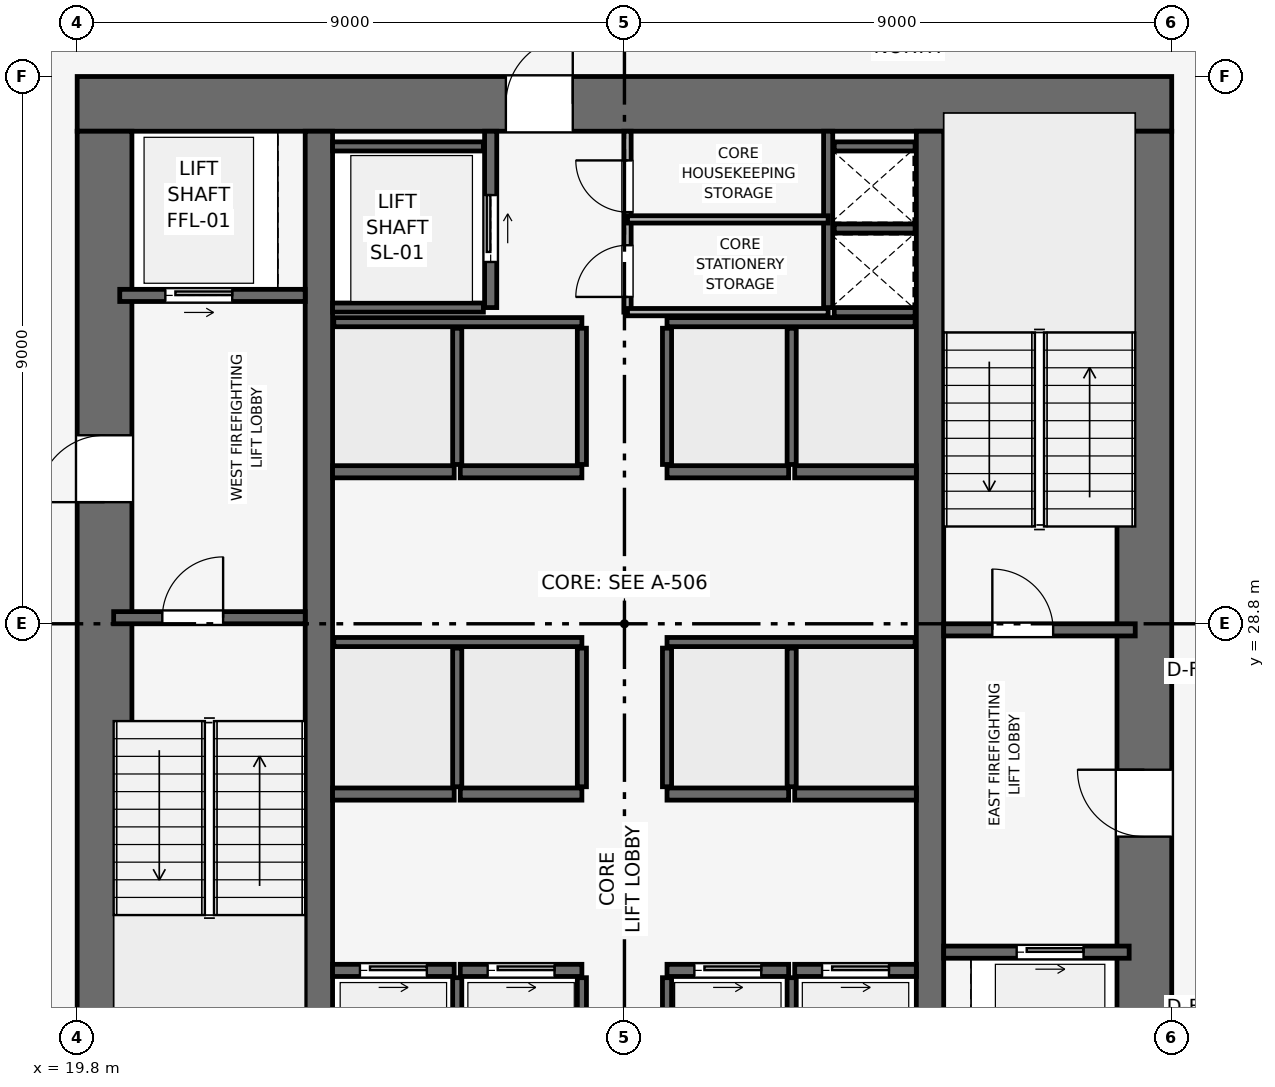
"""IFC4 building model, lengths in metres.
Left out: names, types, materials, properties, quantities, classifications, styles, units other than length and angle.
Written with IfcOpenShell. Run it as: python <this file> out.ifc"""

import sys

from ifc_helpers import new_model, si_unit, direction, frame, frame_2d, origin, place, context, subcontext, project, spatial, rectangle, extrude, element, fill, save


model = new_model("IFC4")
c1 = context("Model", 3, precision=1e-05, world=origin(), true_north=direction((0.0, 1.0)))
c2 = subcontext(c1, "Body", "Model", "MODEL_VIEW")
j1 = project(units=[si_unit("LENGTHUNIT", "METRE"), si_unit("PLANEANGLEUNIT", "RADIAN")], contexts=[c1])
p1 = place(None, origin())
s1 = spatial("IfcSite", under=j1, at=p1, CompositionType="ELEMENT")
p2 = place(p1, origin())
s2 = spatial("IfcBuilding", under=s1, at=p2, CompositionType="ELEMENT")
p3 = place(p2, frame((0.0, 0.0, 117.3)))
s3 = spatial("IfcBuildingStorey", under=s2, at=p3, CompositionType="ELEMENT", Elevation=117.3)
p4 = place(p3, frame((19.8, 37.35, 0.0), z_axis=(0.0, 0.0, 1.0), x_axis=(1.0, 0.0, 0.0)))
e1 = element("IfcWall", 1, at=p4, inside=s3, PredefinedType="SHEAR", context=c2, shape_type="SweptSolid", body=[
    extrude(rectangle(XDim=18.0, YDim=0.9, at=frame_2d((9.0, 0.0))), origin(), (0.0, 0.0, 1.0), 3.9),
])
p5 = place(p4, frame((7.05, 0.0, 0.0)))
e2 = element("IfcOpeningElement", 2, at=p5, cuts=e1, PredefinedType="OPENING", context=c2, shape_type="SweptSolid", body=[
    extrude(rectangle(XDim=1.1, YDim=2.15, at=frame_2d((0.55, 1.075))), frame((0.0, 0.46, 0.0), z_axis=(0.0, -1.0, 0.0), x_axis=(1.0, 0.0, 0.0)), (0.0, 0.0, 1.0), 0.92),
])
p6 = place(p3, frame((20.25, 20.7, 0.0), z_axis=(0.0, 0.0, 1.0), x_axis=(0.0, 1.0, 0.0)))
e3 = element("IfcWall", 3, at=p6, inside=s3, PredefinedType="SHEAR", context=c2, shape_type="SweptSolid", body=[
    extrude(rectangle(XDim=16.2, YDim=0.9, at=frame_2d((8.1, 0.0))), origin(), (0.0, 0.0, 1.0), 3.9),
])
p7 = place(p6, frame((10.1, 0.0, 0.0)))
e4 = element("IfcOpeningElement", 4, at=p7, cuts=e3, PredefinedType="OPENING", context=c2, shape_type="SweptSolid", body=[
    extrude(rectangle(XDim=1.1, YDim=2.15, at=frame_2d((0.55, 1.075))), frame((0.0, 0.46, 0.0), z_axis=(0.0, -1.0, 0.0), x_axis=(1.0, 0.0, 0.0)), (0.0, 0.0, 1.0), 0.92),
])
p8 = place(p3, frame((37.35, 20.7, 0.0), z_axis=(0.0, 0.0, 1.0), x_axis=(0.0, 1.0, 0.0)))
e5 = element("IfcWall", 5, at=p8, inside=s3, PredefinedType="SHEAR", context=c2, shape_type="SweptSolid", body=[
    extrude(rectangle(XDim=16.2, YDim=0.9, at=frame_2d((8.1, 0.0))), origin(), (0.0, 0.0, 1.0), 3.9),
])
p9 = place(p8, frame((4.6, 0.0, 0.0)))
e6 = element("IfcOpeningElement", 6, at=p9, cuts=e5, PredefinedType="OPENING", context=c2, shape_type="SweptSolid", body=[
    extrude(rectangle(XDim=1.1, YDim=2.15, at=frame_2d((0.55, 1.075))), frame((0.0, 0.46, 0.0), z_axis=(0.0, -1.0, 0.0), x_axis=(1.0, 0.0, 0.0)), (0.0, 0.0, 1.0), 0.92),
])
for number, where, z_axis, x_axis in (
    (7, (23.775, 20.7, 0.0), (0.0, 0.0, 1.0), (0.0, 1.0, 0.0)),
    (8, (33.825, 20.7, 0.0), (0.0, 0.0, 1.0), (0.0, 1.0, 0.0)),
):
    element("IfcWall", number, at=place(p3, frame(where, z_axis=z_axis, x_axis=x_axis)), inside=s3, PredefinedType="SHEAR", context=c2, shape_type="SweptSolid", body=[
        extrude(rectangle(XDim=16.2, YDim=0.45, at=frame_2d((8.1, 0.0))), origin(), (0.0, 0.0, 1.0), 3.9),
    ])
p10 = place(p3, frame((20.4, 28.9, 0.0), z_axis=(0.0, 0.0, 1.0), x_axis=(1.0, 0.0, 0.0)))
e9 = element("IfcWall", 9, at=p10, inside=s3, PredefinedType="SHEAR", context=c2, shape_type="SweptSolid", body=[
    extrude(rectangle(XDim=3.15, YDim=0.2, at=frame_2d((1.575, 0.0))), origin(), (0.0, 0.0, 1.0), 3.65),
])
p11 = place(p10, frame((0.8, 0.0, 0.0)))
e10 = element("IfcOpeningElement", 10, at=p11, cuts=e9, PredefinedType="OPENING", context=c2, shape_type="SweptSolid", body=[
    extrude(rectangle(XDim=1.0, YDim=2.1, at=frame_2d((0.5, 1.05))), frame((0.0, 0.11, 0.0), z_axis=(0.0, -1.0, 0.0), x_axis=(1.0, 0.0, 0.0)), (0.0, 0.0, 1.0), 0.22),
])
p12 = place(p3, frame((34.05, 28.7, 0.0), z_axis=(0.0, 0.0, 1.0), x_axis=(1.0, 0.0, 0.0)))
e11 = element("IfcWall", 11, at=p12, inside=s3, PredefinedType="SHEAR", context=c2, shape_type="SweptSolid", body=[
    extrude(rectangle(XDim=3.15, YDim=0.2, at=frame_2d((1.575, 0.0))), origin(), (0.0, 0.0, 1.0), 3.65),
])
p13 = place(p12, frame((0.8, 0.0, 0.0)))
e12 = element("IfcOpeningElement", 12, at=p13, cuts=e11, PredefinedType="OPENING", context=c2, shape_type="SweptSolid", body=[
    extrude(rectangle(XDim=1.0, YDim=2.1, at=frame_2d((0.5, 1.05))), frame((0.0, 0.11, 0.0), z_axis=(0.0, -1.0, 0.0), x_axis=(1.0, 0.0, 0.0)), (0.0, 0.0, 1.0), 0.22),
])
p14 = place(p3, frame((32.15, 34.0, 0.0), z_axis=(0.0, 0.0, 1.0), x_axis=(0.0, 1.0, 0.0)))
e13 = element("IfcWall", 13, at=p14, inside=s3, PredefinedType="SHEAR", context=c2, shape_type="SweptSolid", body=[
    extrude(rectangle(XDim=2.9, YDim=0.15, at=frame_2d((1.45, 0.0))), origin(), (0.0, 0.0, 1.0), 3.65),
])
for number, where, z_axis, x_axis in (
    (14, (32.25, 33.925, 0.0), (0.0, 0.0, 1.0), (1.0, 0.0, 0.0)),
    (15, (32.25, 35.3, 0.0), (0.0, 0.0, 1.0), (1.0, 0.0, 0.0)),
):
    element("IfcWall", number, at=place(p3, frame(where, z_axis=z_axis, x_axis=x_axis)), inside=s3, PredefinedType="SHEAR", context=c2, shape_type="SweptSolid", body=[
        extrude(rectangle(XDim=1.33, YDim=0.15, at=frame_2d((0.665, 0.0))), origin(), (0.0, 0.0, 1.0), 3.65),
    ])
p15 = place(p3, frame((20.5, 34.2, 0.0), z_axis=(0.0, 0.0, 1.0), x_axis=(1.0, 0.0, 0.0)))
e16 = element("IfcWall", 16, at=p15, inside=s3, PredefinedType="SHEAR", context=c2, shape_type="SweptSolid", body=[
    extrude(rectangle(XDim=3.05, YDim=0.2, at=frame_2d((1.525, 0.0))), origin(), (0.0, 0.0, 1.0), 3.65),
])
p16 = place(p15, frame((0.75, 0.0, 0.0)))
e17 = element("IfcOpeningElement", 17, at=p16, cuts=e16, PredefinedType="OPENING", context=c2, shape_type="SweptSolid", body=[
    extrude(rectangle(XDim=1.1, YDim=2.15, at=frame_2d((0.55, 1.075))), frame((0.0, 0.11, 0.0), z_axis=(0.0, -1.0, 0.0), x_axis=(1.0, 0.0, 0.0)), (0.0, 0.0, 1.0), 0.22),
])
p17 = place(p3, frame((34.05, 23.4, 0.0), z_axis=(0.0, 0.0, 1.0), x_axis=(1.0, 0.0, 0.0)))
e18 = element("IfcWall", 18, at=p17, inside=s3, PredefinedType="SHEAR", context=c2, shape_type="SweptSolid", body=[
    extrude(rectangle(XDim=3.05, YDim=0.2, at=frame_2d((1.525, 0.0))), origin(), (0.0, 0.0, 1.0), 3.65),
])
p18 = place(p17, frame((1.2, 0.0, 0.0)))
e19 = element("IfcOpeningElement", 19, at=p18, cuts=e18, PredefinedType="OPENING", context=c2, shape_type="SweptSolid", body=[
    extrude(rectangle(XDim=1.1, YDim=2.15, at=frame_2d((0.55, 1.075))), frame((0.0, 0.11, 0.0), z_axis=(0.0, -1.0, 0.0), x_axis=(1.0, 0.0, 0.0)), (0.0, 0.0, 1.0), 0.22),
])
p19 = place(p3, frame((26.6, 34.0, 0.0), z_axis=(0.0, 0.0, 1.0), x_axis=(0.0, 1.0, 0.0)))
e20 = element("IfcWall", 20, at=p19, inside=s3, PredefinedType="SHEAR", context=c2, shape_type="SweptSolid", body=[
    extrude(rectangle(XDim=2.9, YDim=0.2, at=frame_2d((1.45, 0.0))), origin(), (0.0, 0.0, 1.0), 3.65),
])
p20 = place(p19, frame((0.75, 0.0, 0.0)))
e21 = element("IfcOpeningElement", 21, at=p20, cuts=e20, PredefinedType="OPENING", context=c2, shape_type="SweptSolid", body=[
    extrude(rectangle(XDim=1.1, YDim=2.15, at=frame_2d((0.55, 1.075))), frame((0.0, 0.11, 0.0), z_axis=(0.0, -1.0, 0.0), x_axis=(1.0, 0.0, 0.0)), (0.0, 0.0, 1.0), 0.22),
])
for number, where, z_axis, x_axis in (
    (22, (24.0, 34.0, 0.0), (0.0, 0.0, 1.0), (1.0, 0.0, 0.0)),
    (23, (24.0, 36.65, 0.0), (0.0, 0.0, 1.0), (1.0, 0.0, 0.0)),
):
    element("IfcWall", number, at=place(p3, frame(where, z_axis=z_axis, x_axis=x_axis)), inside=s3, PredefinedType="SHEAR", context=c2, shape_type="SweptSolid", body=[
        extrude(rectangle(XDim=2.48, YDim=0.15, at=frame_2d((1.24, 0.0))), origin(), (0.0, 0.0, 1.0), 3.65),
    ])
p21 = place(p3, frame((24.0, 23.1, 0.0), z_axis=(0.0, 0.0, 1.0), x_axis=(1.0, 0.0, 0.0)))
e24 = element("IfcWall", 24, at=p21, inside=s3, PredefinedType="SHEAR", context=c2, shape_type="SweptSolid", body=[
    extrude(rectangle(XDim=2.0, YDim=0.2, at=frame_2d((1.0, 0.0))), origin(), (0.0, 0.0, 1.0), 3.65),
])
p22 = place(p21, frame((0.45, 0.0, 0.0)))
e25 = element("IfcOpeningElement", 25, at=p22, cuts=e24, PredefinedType="OPENING", context=c2, shape_type="SweptSolid", body=[
    extrude(rectangle(XDim=1.1, YDim=2.15, at=frame_2d((0.55, 1.075))), frame((0.0, 0.11, 0.0), z_axis=(0.0, -1.0, 0.0), x_axis=(1.0, 0.0, 0.0)), (0.0, 0.0, 1.0), 0.22),
])
p23 = place(p3, frame((26.1, 23.1, 0.0), z_axis=(0.0, 0.0, 1.0), x_axis=(1.0, 0.0, 0.0)))
e26 = element("IfcWall", 26, at=p23, inside=s3, PredefinedType="SHEAR", context=c2, shape_type="SweptSolid", body=[
    extrude(rectangle(XDim=2.0, YDim=0.2, at=frame_2d((1.0, 0.0))), origin(), (0.0, 0.0, 1.0), 3.65),
])
p24 = place(p23, frame((0.45, 0.0, 0.0)))
e27 = element("IfcOpeningElement", 27, at=p24, cuts=e26, PredefinedType="OPENING", context=c2, shape_type="SweptSolid", body=[
    extrude(rectangle(XDim=1.1, YDim=2.15, at=frame_2d((0.55, 1.075))), frame((0.0, 0.11, 0.0), z_axis=(0.0, -1.0, 0.0), x_axis=(1.0, 0.0, 0.0)), (0.0, 0.0, 1.0), 0.22),
])
p25 = place(p3, frame((29.5, 23.1, 0.0), z_axis=(0.0, 0.0, 1.0), x_axis=(1.0, 0.0, 0.0)))
e28 = element("IfcWall", 28, at=p25, inside=s3, PredefinedType="SHEAR", context=c2, shape_type="SweptSolid", body=[
    extrude(rectangle(XDim=2.0, YDim=0.2, at=frame_2d((1.0, 0.0))), origin(), (0.0, 0.0, 1.0), 3.65),
])
p26 = place(p25, frame((0.45, 0.0, 0.0)))
e29 = element("IfcOpeningElement", 29, at=p26, cuts=e28, PredefinedType="OPENING", context=c2, shape_type="SweptSolid", body=[
    extrude(rectangle(XDim=1.1, YDim=2.15, at=frame_2d((0.55, 1.075))), frame((0.0, 0.11, 0.0), z_axis=(0.0, -1.0, 0.0), x_axis=(1.0, 0.0, 0.0)), (0.0, 0.0, 1.0), 0.22),
])
p27 = place(p3, frame((31.6, 23.1, 0.0), z_axis=(0.0, 0.0, 1.0), x_axis=(1.0, 0.0, 0.0)))
e30 = element("IfcWall", 30, at=p27, inside=s3, PredefinedType="SHEAR", context=c2, shape_type="SweptSolid", body=[
    extrude(rectangle(XDim=2.0, YDim=0.2, at=frame_2d((1.0, 0.0))), origin(), (0.0, 0.0, 1.0), 3.65),
])
p28 = place(p27, frame((0.45, 0.0, 0.0)))
e31 = element("IfcOpeningElement", 31, at=p28, cuts=e30, PredefinedType="OPENING", context=c2, shape_type="SweptSolid", body=[
    extrude(rectangle(XDim=1.1, YDim=2.15, at=frame_2d((0.55, 1.075))), frame((0.0, 0.11, 0.0), z_axis=(0.0, -1.0, 0.0), x_axis=(1.0, 0.0, 0.0)), (0.0, 0.0, 1.0), 0.22),
])
for number, where, z_axis, x_axis in (
    (32, (24.0, 26.0, 0.0), (0.0, 0.0, 1.0), (1.0, 0.0, 0.0)),
    (33, (26.1, 26.0, 0.0), (0.0, 0.0, 1.0), (1.0, 0.0, 0.0)),
    (34, (29.5, 26.0, 0.0), (0.0, 0.0, 1.0), (1.0, 0.0, 0.0)),
    (35, (31.6, 26.0, 0.0), (0.0, 0.0, 1.0), (1.0, 0.0, 0.0)),
    (36, (24.0, 31.3, 0.0), (0.0, 0.0, 1.0), (1.0, 0.0, 0.0)),
    (37, (26.1, 31.3, 0.0), (0.0, 0.0, 1.0), (1.0, 0.0, 0.0)),
    (38, (29.5, 31.3, 0.0), (0.0, 0.0, 1.0), (1.0, 0.0, 0.0)),
    (39, (31.6, 31.3, 0.0), (0.0, 0.0, 1.0), (1.0, 0.0, 0.0)),
):
    element("IfcWall", number, at=place(p3, frame(where, z_axis=z_axis, x_axis=x_axis)), inside=s3, PredefinedType="SHEAR", context=c2, shape_type="SweptSolid", body=[
        extrude(rectangle(XDim=2.0, YDim=0.2, at=frame_2d((1.0, 0.0))), origin(), (0.0, 0.0, 1.0), 3.65),
    ])
p29 = place(p3, frame((32.25, 36.65, 0.0), z_axis=(0.0, 0.0, 1.0), x_axis=(1.0, 0.0, 0.0)))
e40 = element("IfcWall", 40, at=p29, inside=s3, PredefinedType="SHEAR", context=c2, shape_type="SweptSolid", body=[
    extrude(rectangle(XDim=1.33, YDim=0.15, at=frame_2d((0.665, 0.0))), origin(), (0.0, 0.0, 1.0), 3.65),
])
for number, where, z_axis, x_axis in (
    (41, (26.05, 20.72, 0.0), (0.0, 0.0, 1.0), (0.0, 1.0, 0.0)),
    (42, (28.1, 20.72, 0.0), (0.0, 0.0, 1.0), (0.0, 1.0, 0.0)),
    (43, (29.5, 20.72, 0.0), (0.0, 0.0, 1.0), (0.0, 1.0, 0.0)),
    (44, (31.55, 20.72, 0.0), (0.0, 0.0, 1.0), (0.0, 1.0, 0.0)),
):
    element("IfcWall", number, at=place(p3, frame(where, z_axis=z_axis, x_axis=x_axis)), inside=s3, PredefinedType="SHEAR", context=c2, shape_type="SweptSolid", body=[
        extrude(rectangle(XDim=2.26, YDim=0.15, at=frame_2d((1.13, 0.0))), origin(), (0.0, 0.0, 1.0), 3.65),
    ])
for number, where, z_axis, x_axis in (
    (45, (24.02, 28.5, 0.0), (0.0, 0.0, 1.0), (1.0, 0.0, 0.0)),
    (46, (29.5, 28.5, 0.0), (0.0, 0.0, 1.0), (1.0, 0.0, 0.0)),
):
    element("IfcWall", number, at=place(p3, frame(where, z_axis=z_axis, x_axis=x_axis)), inside=s3, PredefinedType="SHEAR", context=c2, shape_type="SweptSolid", body=[
        extrude(rectangle(XDim=4.08, YDim=0.15, at=frame_2d((2.04, 0.0))), origin(), (0.0, 0.0, 1.0), 3.65),
    ])
for number, where, z_axis, x_axis in (
    (47, (26.05, 26.12, 0.0), (0.0, 0.0, 1.0), (0.0, 1.0, 0.0)),
    (48, (28.1, 26.12, 0.0), (0.0, 0.0, 1.0), (0.0, 1.0, 0.0)),
    (49, (29.5, 26.12, 0.0), (0.0, 0.0, 1.0), (0.0, 1.0, 0.0)),
    (50, (31.55, 26.12, 0.0), (0.0, 0.0, 1.0), (0.0, 1.0, 0.0)),
):
    element("IfcWall", number, at=place(p3, frame(where, z_axis=z_axis, x_axis=x_axis)), inside=s3, PredefinedType="SHEAR", context=c2, shape_type="SweptSolid", body=[
        extrude(rectangle(XDim=2.28, YDim=0.15, at=frame_2d((1.14, 0.0))), origin(), (0.0, 0.0, 1.0), 3.65),
    ])
for number, where, z_axis, x_axis in (
    (51, (24.02, 33.76, 0.0), (0.0, 0.0, 1.0), (1.0, 0.0, 0.0)),
    (52, (29.5, 33.76, 0.0), (0.0, 0.0, 1.0), (1.0, 0.0, 0.0)),
):
    element("IfcWall", number, at=place(p3, frame(where, z_axis=z_axis, x_axis=x_axis)), inside=s3, PredefinedType="SHEAR", context=c2, shape_type="SweptSolid", body=[
        extrude(rectangle(XDim=4.08, YDim=0.15, at=frame_2d((2.04, 0.0))), origin(), (0.0, 0.0, 1.0), 3.65),
    ])
for number, where, z_axis, x_axis in (
    (53, (26.05, 31.42, 0.0), (0.0, 0.0, 1.0), (0.0, 1.0, 0.0)),
    (54, (28.1, 31.42, 0.0), (0.0, 0.0, 1.0), (0.0, 1.0, 0.0)),
    (55, (29.5, 31.42, 0.0), (0.0, 0.0, 1.0), (0.0, 1.0, 0.0)),
    (56, (31.55, 31.42, 0.0), (0.0, 0.0, 1.0), (0.0, 1.0, 0.0)),
):
    element("IfcWall", number, at=place(p3, frame(where, z_axis=z_axis, x_axis=x_axis)), inside=s3, PredefinedType="SHEAR", context=c2, shape_type="SweptSolid", body=[
        extrude(rectangle(XDim=2.24, YDim=0.15, at=frame_2d((1.12, 0.0))), origin(), (0.0, 0.0, 1.0), 3.65),
    ])
p30 = place(p3, frame((28.85, 33.925, 0.0), z_axis=(0.0, 0.0, 1.0), x_axis=(0.0, 1.0, 0.0)))
e57 = element("IfcWall", 57, at=p30, inside=s3, PredefinedType="PARTITIONING", context=c2, shape_type="SweptSolid", body=[
    extrude(rectangle(XDim=2.975, YDim=0.12, at=frame_2d((1.487, 0.0))), origin(), (0.0, 0.0, 1.0), 3.65),
])
p31 = place(p30, frame((0.25, 0.0, 0.0)))
e58 = element("IfcOpeningElement", 58, at=p31, cuts=e57, PredefinedType="OPENING", context=c2, shape_type="SweptSolid", body=[
    extrude(rectangle(XDim=0.85, YDim=2.1, at=frame_2d((0.425, 1.05))), frame((0.0, 0.07, 0.0), z_axis=(0.0, -1.0, 0.0), x_axis=(1.0, 0.0, 0.0)), (0.0, 0.0, 1.0), 0.14),
])
p32 = place(p30, frame((1.645, 0.0, 0.0)))
e59 = element("IfcOpeningElement", 59, at=p32, cuts=e57, PredefinedType="OPENING", context=c2, shape_type="SweptSolid", body=[
    extrude(rectangle(XDim=0.85, YDim=2.1, at=frame_2d((0.425, 1.05))), frame((0.0, 0.07, 0.0), z_axis=(0.0, -1.0, 0.0), x_axis=(1.0, 0.0, 0.0)), (0.0, 0.0, 1.0), 0.14),
])
for number, where, z_axis, x_axis in (
    (60, (28.85, 35.45, 0.0), (0.0, 0.0, 1.0), (1.0, 0.0, 0.0)),
    (61, (28.85, 33.925, 0.0), (0.0, 0.0, 1.0), (1.0, 0.0, 0.0)),
):
    element("IfcWall", number, at=place(p3, frame(where, z_axis=z_axis, x_axis=x_axis)), inside=s3, PredefinedType="PARTITIONING", context=c2, shape_type="SweptSolid", body=[
        extrude(rectangle(XDim=3.3, YDim=0.12, at=frame_2d((1.65, 0.0))), origin(), (0.0, 0.0, 1.0), 3.65),
    ])
p33 = place(p11, origin())
e62 = element("IfcDoor", 62, at=p33, inside=s3, OperationType="SINGLE_SWING_RIGHT", PredefinedType="DOOR", context=c2, shape_type="SweptSolid", body=[
    extrude(rectangle(XDim=1.0, YDim=2.1, at=frame_2d((0.5, 1.05))), frame((0.0, 0.025, 0.0), z_axis=(0.0, -1.0, 0.0), x_axis=(1.0, 0.0, 0.0)), (0.0, 0.0, 1.0), 0.05),
])
fill(e10, e62)
p34 = place(p13, origin())
e63 = element("IfcDoor", 63, at=p34, inside=s3, OperationType="SINGLE_SWING_LEFT", PredefinedType="DOOR", context=c2, shape_type="SweptSolid", body=[
    extrude(rectangle(XDim=1.0, YDim=2.1, at=frame_2d((0.5, 1.05))), frame((0.0, 0.025, 0.0), z_axis=(0.0, -1.0, 0.0), x_axis=(1.0, 0.0, 0.0)), (0.0, 0.0, 1.0), 0.05),
])
fill(e12, e63)
p35 = place(p16, origin())
e64 = element("IfcDoor", 64, at=p35, inside=s3, OperationType="SLIDING_TO_RIGHT", PredefinedType="DOOR", context=c2, shape_type="SweptSolid", body=[
    extrude(rectangle(XDim=1.1, YDim=2.15, at=frame_2d((0.55, 1.075))), frame((0.0, 0.025, 0.0), z_axis=(0.0, -1.0, 0.0), x_axis=(1.0, 0.0, 0.0)), (0.0, 0.0, 1.0), 0.05),
])
fill(e17, e64)
p36 = place(p18, origin())
e65 = element("IfcDoor", 65, at=p36, inside=s3, OperationType="SLIDING_TO_RIGHT", PredefinedType="DOOR", context=c2, shape_type="SweptSolid", body=[
    extrude(rectangle(XDim=1.1, YDim=2.15, at=frame_2d((0.55, 1.075))), frame((0.0, 0.025, 0.0), z_axis=(0.0, -1.0, 0.0), x_axis=(1.0, 0.0, 0.0)), (0.0, 0.0, 1.0), 0.05),
])
fill(e19, e65)
p37 = place(p20, origin())
e66 = element("IfcDoor", 66, at=p37, inside=s3, OperationType="SLIDING_TO_RIGHT", PredefinedType="DOOR", context=c2, shape_type="SweptSolid", body=[
    extrude(rectangle(XDim=1.1, YDim=2.15, at=frame_2d((0.55, 1.075))), frame((0.0, 0.025, 0.0), z_axis=(0.0, -1.0, 0.0), x_axis=(1.0, 0.0, 0.0)), (0.0, 0.0, 1.0), 0.05),
])
fill(e21, e66)
p38 = place(p22, origin())
e67 = element("IfcDoor", 67, at=p38, inside=s3, OperationType="SLIDING_TO_RIGHT", PredefinedType="DOOR", context=c2, shape_type="SweptSolid", body=[
    extrude(rectangle(XDim=1.1, YDim=2.15, at=frame_2d((0.55, 1.075))), frame((0.0, 0.025, 0.0), z_axis=(0.0, -1.0, 0.0), x_axis=(1.0, 0.0, 0.0)), (0.0, 0.0, 1.0), 0.05),
])
fill(e25, e67)
p39 = place(p24, origin())
e68 = element("IfcDoor", 68, at=p39, inside=s3, OperationType="SLIDING_TO_RIGHT", PredefinedType="DOOR", context=c2, shape_type="SweptSolid", body=[
    extrude(rectangle(XDim=1.1, YDim=2.15, at=frame_2d((0.55, 1.075))), frame((0.0, 0.025, 0.0), z_axis=(0.0, -1.0, 0.0), x_axis=(1.0, 0.0, 0.0)), (0.0, 0.0, 1.0), 0.05),
])
fill(e27, e68)
p40 = place(p26, origin())
e69 = element("IfcDoor", 69, at=p40, inside=s3, OperationType="SLIDING_TO_RIGHT", PredefinedType="DOOR", context=c2, shape_type="SweptSolid", body=[
    extrude(rectangle(XDim=1.1, YDim=2.15, at=frame_2d((0.55, 1.075))), frame((0.0, 0.025, 0.0), z_axis=(0.0, -1.0, 0.0), x_axis=(1.0, 0.0, 0.0)), (0.0, 0.0, 1.0), 0.05),
])
fill(e29, e69)
p41 = place(p28, origin())
e70 = element("IfcDoor", 70, at=p41, inside=s3, OperationType="SLIDING_TO_RIGHT", PredefinedType="DOOR", context=c2, shape_type="SweptSolid", body=[
    extrude(rectangle(XDim=1.1, YDim=2.15, at=frame_2d((0.55, 1.075))), frame((0.0, 0.025, 0.0), z_axis=(0.0, -1.0, 0.0), x_axis=(1.0, 0.0, 0.0)), (0.0, 0.0, 1.0), 0.05),
])
fill(e31, e70)
p42 = place(p31, origin())
e71 = element("IfcDoor", 71, at=p42, inside=s3, OperationType="SINGLE_SWING_LEFT", PredefinedType="DOOR", context=c2, shape_type="SweptSolid", body=[
    extrude(rectangle(XDim=0.85, YDim=2.1, at=frame_2d((0.425, 1.05))), frame((0.0, 0.025, 0.0), z_axis=(0.0, -1.0, 0.0), x_axis=(1.0, 0.0, 0.0)), (0.0, 0.0, 1.0), 0.05),
])
fill(e58, e71)
p43 = place(p32, origin())
e72 = element("IfcDoor", 72, at=p43, inside=s3, OperationType="SINGLE_SWING_RIGHT", PredefinedType="DOOR", context=c2, shape_type="SweptSolid", body=[
    extrude(rectangle(XDim=0.85, YDim=2.1, at=frame_2d((0.425, 1.05))), frame((0.0, 0.025, 0.0), z_axis=(0.0, -1.0, 0.0), x_axis=(1.0, 0.0, 0.0)), (0.0, 0.0, 1.0), 0.05),
])
fill(e59, e72)
p44 = place(p7, origin())
e73 = element("IfcDoor", 73, at=p44, inside=s3, OperationType="SINGLE_SWING_LEFT", PredefinedType="DOOR", context=c2, shape_type="SweptSolid", body=[
    extrude(rectangle(XDim=1.1, YDim=2.15, at=frame_2d((0.55, 1.075))), frame((0.0, 0.025, 0.0), z_axis=(0.0, -1.0, 0.0), x_axis=(1.0, 0.0, 0.0)), (0.0, 0.0, 1.0), 0.05),
])
fill(e4, e73)
p45 = place(p9, origin())
e74 = element("IfcDoor", 74, at=p45, inside=s3, OperationType="SINGLE_SWING_RIGHT", PredefinedType="DOOR", context=c2, shape_type="SweptSolid", body=[
    extrude(rectangle(XDim=1.1, YDim=2.15, at=frame_2d((0.55, 1.075))), frame((0.0, 0.025, 0.0), z_axis=(0.0, -1.0, 0.0), x_axis=(1.0, 0.0, 0.0)), (0.0, 0.0, 1.0), 0.05),
])
fill(e6, e74)
p46 = place(p5, origin())
e75 = element("IfcDoor", 75, at=p46, inside=s3, OperationType="SINGLE_SWING_RIGHT", PredefinedType="DOOR", context=c2, shape_type="SweptSolid", body=[
    extrude(rectangle(XDim=1.1, YDim=2.15, at=frame_2d((0.55, 1.075))), frame((0.0, 0.025, 0.0), z_axis=(0.0, -1.0, 0.0), x_axis=(1.0, 0.0, 0.0)), (0.0, 0.0, 1.0), 0.05),
])
fill(e2, e75)
save(model, sys.argv[1])
